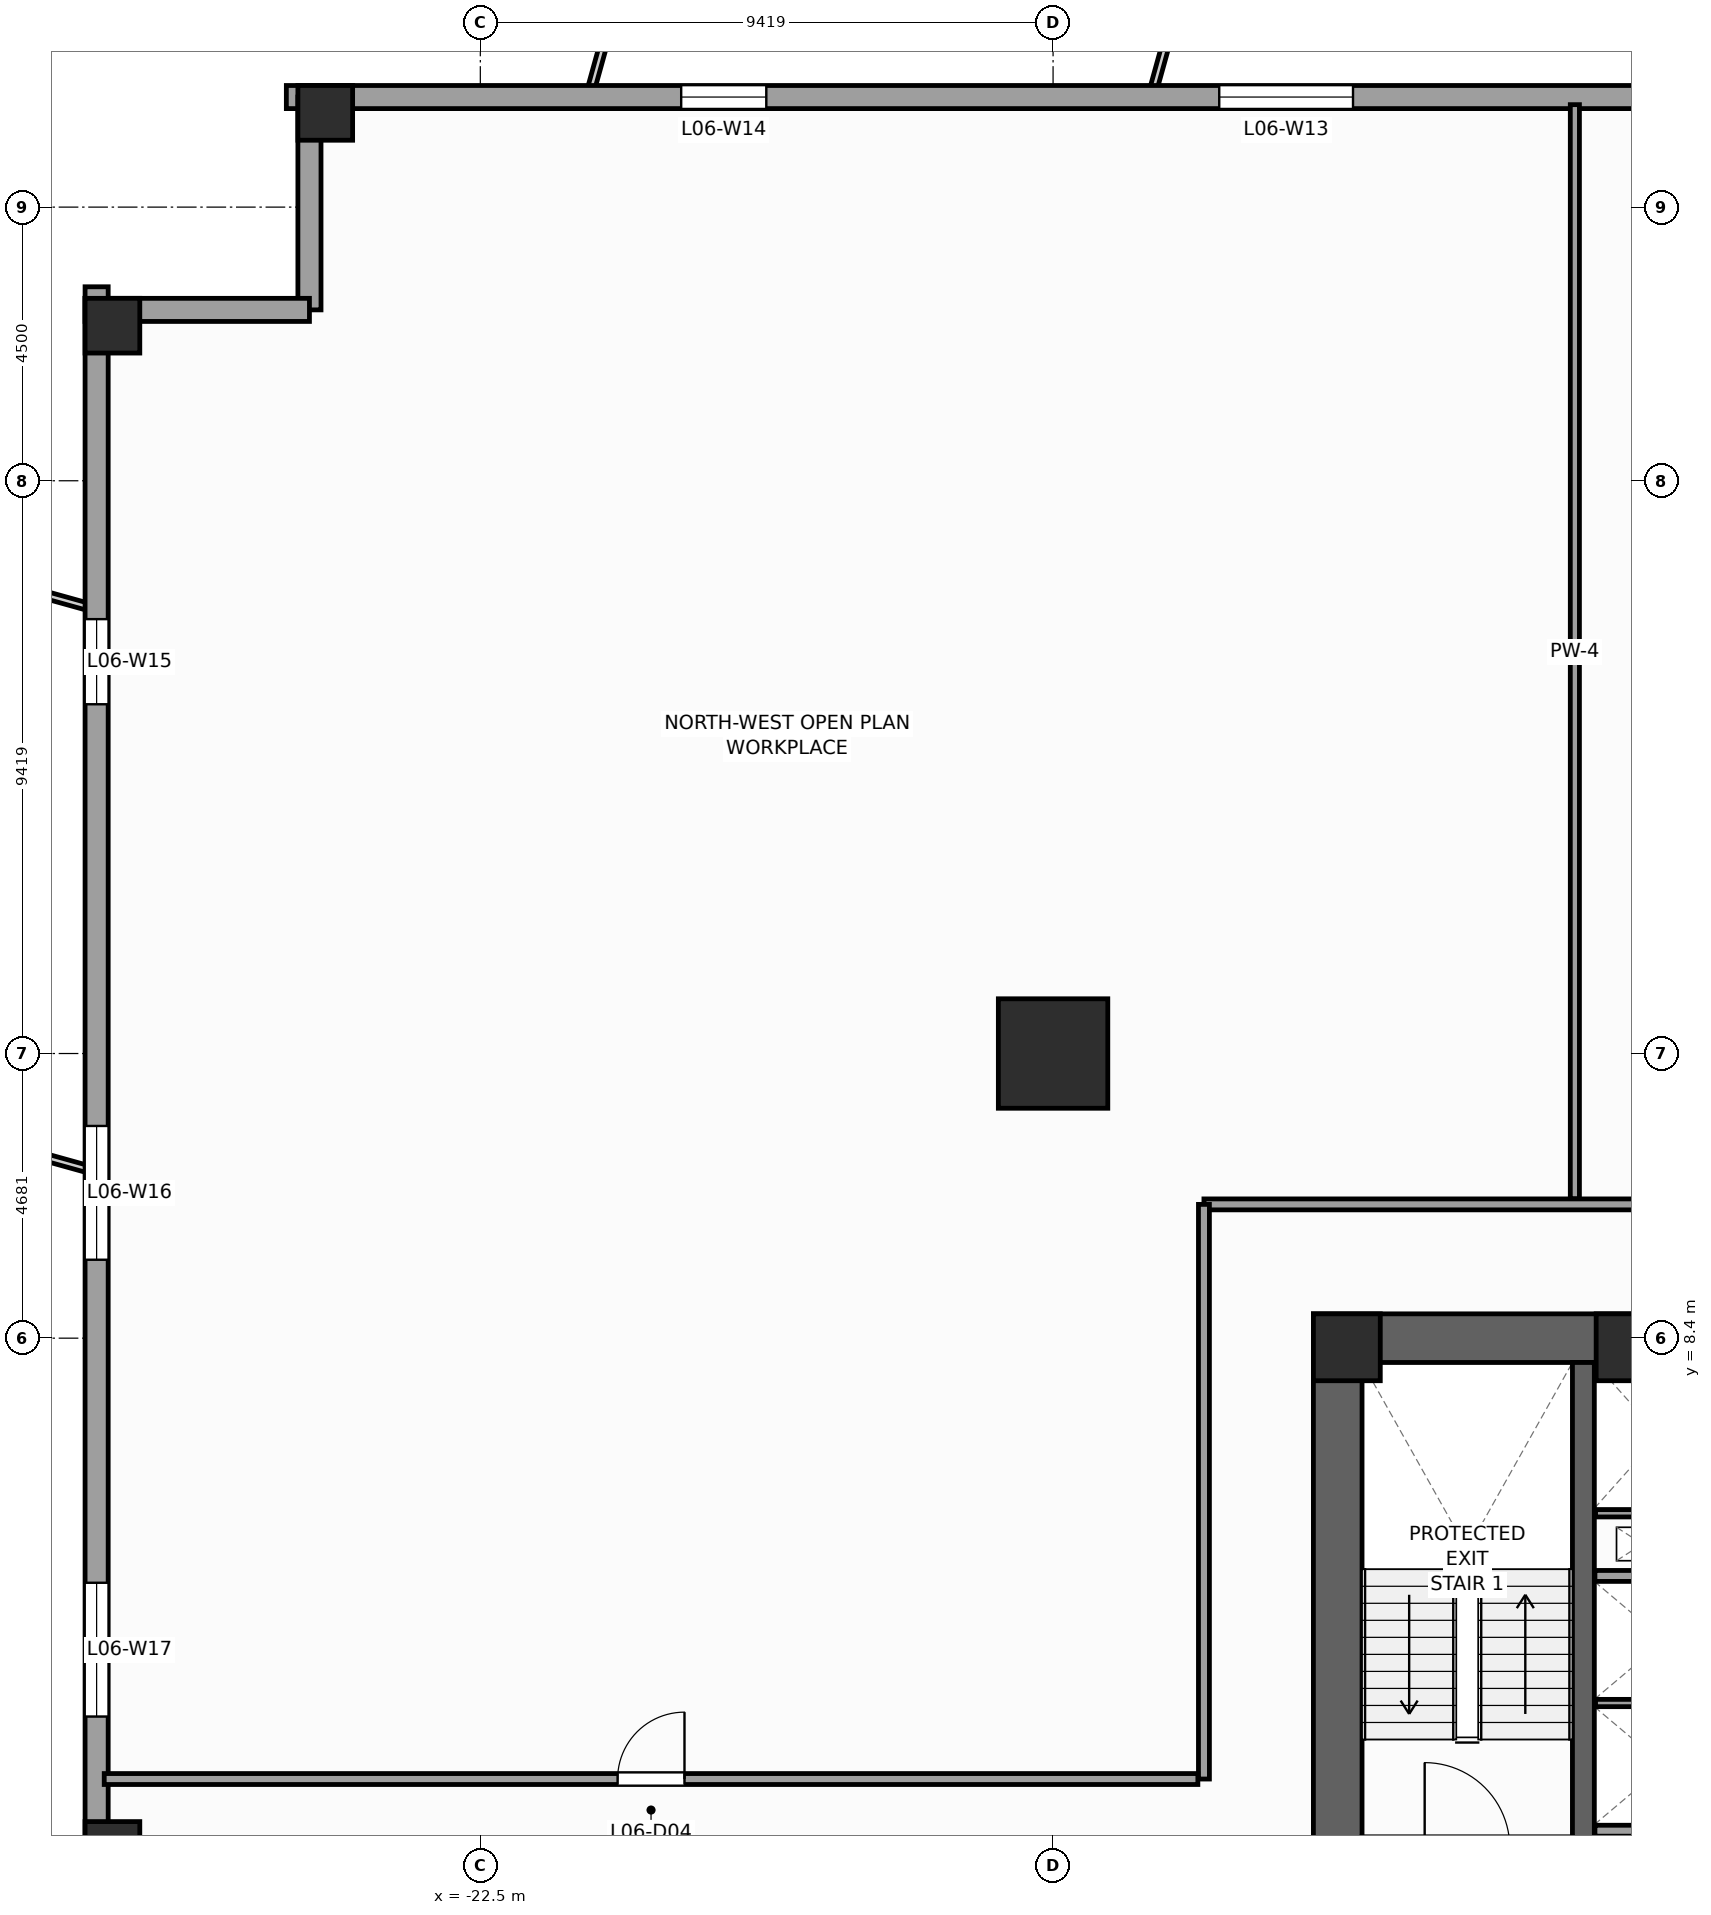
"""IFC4 building model, lengths in metres.
Left out: names, types, materials, properties, quantities, classifications, styles, units other than length and angle.
Written with IfcOpenShell. Run it as: python <this file> out.ifc"""

import sys

from ifc_helpers import new_model, si_unit, direction, frame, frame_2d, origin, origin_2d, place, context, subcontext, project, spatial, rectangle, extrude, source, transform, mapped, element, fill, save


model = new_model("IFC4")
c1 = context("Model", 3, precision=1e-05, world=origin(), true_north=direction((0.0, 1.0)))
c2 = subcontext(c1, "Body", "Model", "MODEL_VIEW")
j1 = project(units=[si_unit("LENGTHUNIT", "METRE"), si_unit("PLANEANGLEUNIT", "RADIAN")], contexts=[c1])
p1 = place(None, origin())
s1 = spatial("IfcSite", under=j1, at=p1, CompositionType="ELEMENT")
p2 = place(p1, origin())
s2 = spatial("IfcBuilding", under=s1, at=p2, CompositionType="ELEMENT")
p3 = place(p2, frame((0.0, 0.0, 30.0)))
s3 = spatial("IfcBuildingStorey", under=s2, at=p3, CompositionType="ELEMENT", Elevation=30.0)
p4 = place(p3, frame((-8.8, 8.4, 0.0), z_axis=(0.0, 0.0, 1.0), x_axis=(1.0, 0.0, 0.0)))
e1 = element("IfcWall", 1, at=p4, inside=s3, PredefinedType="SHEAR", context=c2, shape_type="SweptSolid", body=[
    extrude(rectangle(XDim=17.6, YDim=0.8, at=frame_2d((8.8, 0.0))), origin(), (0.0, 0.0, 1.0), 4.0),
])
p5 = place(p3, frame((-8.4, -8.0, 0.0), z_axis=(0.0, 0.0, 1.0), x_axis=(0.0, 1.0, 0.0)))
e2 = element("IfcWall", 2, at=p5, inside=s3, PredefinedType="SHEAR", context=c2, shape_type="SweptSolid", body=[
    extrude(rectangle(XDim=16.0, YDim=0.8, at=frame_2d((8.0, 0.0))), origin(), (0.0, 0.0, 1.0), 4.0),
])
p6 = place(p5, frame((4.69, 0.0, 0.0)))
e3 = element("IfcOpeningElement", 3, at=p6, cuts=e2, PredefinedType="OPENING", context=c2, shape_type="SweptSolid", body=[
    extrude(rectangle(XDim=1.3, YDim=2.2, at=frame_2d((0.65, 1.1))), frame((0.0, 0.41, 0.0), z_axis=(0.0, -1.0, 0.0), x_axis=(1.0, 0.0, 0.0)), (0.0, 0.0, 1.0), 0.82),
])
p7 = place(p3, frame((-4.36, -8.0, 0.0), z_axis=(0.0, 0.0, 1.0), x_axis=(0.0, 1.0, 0.0)))
e4 = element("IfcWall", 4, at=p7, inside=s3, PredefinedType="SHEAR", context=c2, shape_type="SweptSolid", body=[
    extrude(rectangle(XDim=16.0, YDim=0.36, at=frame_2d((8.0, 0.0))), origin(), (0.0, 0.0, 1.0), 4.0),
])
m1 = source(origin(), c2, "Body", "SweptSolid", [
    extrude(rectangle(XDim=1.1, YDim=1.1, at=origin_2d()), origin(), (0.0, 0.0, 1.0), 4.0),
])
for number, where, z_axis, x_axis in (
    (5, (-8.25, 8.25, 0.0), (0.0, 0.0, 1.0), (1.0, 0.0, 0.0)),
    (6, (-3.6, 8.25, 0.0), (0.0, 0.0, 1.0), (1.0, 0.0, 0.0)),
):
    element("IfcColumn", number, at=place(p3, frame(where, z_axis=z_axis, x_axis=x_axis)), inside=s3, PredefinedType="PILASTER", context=c2, shape_type="MappedRepresentation", body=[
        mapped(m1, transform((0.0, 0.0, 0.0), scale=1.0)),
    ])
m2 = source(origin(), c2, "Body", "SweptSolid", [
    extrude(rectangle(XDim=1.8, YDim=1.8, at=origin_2d()), origin(), (0.0, 0.0, 1.0), 4.0),
])
p8 = place(p3, frame((-13.081, 13.081, 0.0), z_axis=(0.0, 0.0, 1.0), x_axis=(1.0, 0.0, 0.0)))
e7 = element("IfcColumn", 7, at=p8, inside=s3, PredefinedType="COLUMN", context=c2, shape_type="MappedRepresentation", body=[
    mapped(m2, transform((0.0, 0.0, 0.0), scale=1.0)),
])
m3 = source(origin(), c2, "Body", "SweptSolid", [
    extrude(rectangle(XDim=0.9, YDim=0.9, at=origin_2d()), origin(), (0.0, 0.0, 1.0), 4.0),
])
for number, where, z_axis, x_axis in (
    (8, (-25.05, 28.55, 0.0), (0.0, 0.0, 1.0), (1.0, 0.0, 0.0)),
    (9, (-28.55, 25.05, 0.0), (0.0, 0.0, 1.0), (1.0, 0.0, 0.0)),
    (10, (-28.55, 0.0, 0.0), (0.0, 0.0, 1.0), (1.0, 0.0, 0.0)),
):
    element("IfcColumn", number, at=place(p3, frame(where, z_axis=z_axis, x_axis=x_axis)), inside=s3, PredefinedType="COLUMN", context=c2, shape_type="MappedRepresentation", body=[
        mapped(m3, transform((0.0, 0.0, 0.0), scale=1.0)),
    ])
p9 = place(p3, frame((25.69, 28.81, 0.0), z_axis=(0.0, 0.0, 1.0), x_axis=(-1.0, 0.0, 0.0)))
e11 = element("IfcWall", 11, at=p9, inside=s3, PredefinedType="STANDARD", context=c2, shape_type="SweptSolid", body=[
    extrude(rectangle(XDim=51.38, YDim=0.38, at=frame_2d((25.69, 0.0))), origin(), (0.0, 0.0, 1.0), 3.12),
])
p10 = place(p9, frame((19.565, 0.0, 0.0)))
e12 = element("IfcOpeningElement", 12, at=p10, cuts=e11, PredefinedType="OPENING", context=c2, shape_type="SweptSolid", body=[
    extrude(rectangle(XDim=1.05, YDim=2.25, at=frame_2d((0.525, 1.125))), frame((0.0, 0.2, 0.0), z_axis=(0.0, -1.0, 0.0), x_axis=(1.0, 0.0, 0.0)), (0.0, 0.0, 1.0), 0.4),
])
p11 = place(p9, frame((5.466, 0.0, 0.49)))
e13 = element("IfcOpeningElement", 13, at=p11, cuts=e11, PredefinedType="OPENING", context=c2, shape_type="SweptSolid", body=[
    extrude(rectangle(XDim=1.4, YDim=2.4, at=frame_2d((0.7, 1.2))), frame((0.0, 0.2, 0.0), z_axis=(0.0, -1.0, 0.0), x_axis=(1.0, 0.0, 0.0)), (0.0, 0.0, 1.0), 0.4),
])
p12 = place(p9, frame((13.8, 0.0, 0.49)))
e14 = element("IfcOpeningElement", 14, at=p12, cuts=e11, PredefinedType="OPENING", context=c2, shape_type="SweptSolid", body=[
    extrude(rectangle(XDim=2.2, YDim=2.4, at=frame_2d((1.1, 1.2))), frame((0.0, 0.2, 0.0), z_axis=(0.0, -1.0, 0.0), x_axis=(1.0, 0.0, 0.0)), (0.0, 0.0, 1.0), 0.4),
])
p13 = place(p9, frame((22.062, 0.0, 0.49)))
e15 = element("IfcOpeningElement", 15, at=p13, cuts=e11, PredefinedType="OPENING", context=c2, shape_type="SweptSolid", body=[
    extrude(rectangle(XDim=2.2, YDim=2.4, at=frame_2d((1.1, 1.2))), frame((0.0, 0.2, 0.0), z_axis=(0.0, -1.0, 0.0), x_axis=(1.0, 0.0, 0.0)), (0.0, 0.0, 1.0), 0.4),
])
p14 = place(p9, frame((33.838, 0.0, 0.49)))
e16 = element("IfcOpeningElement", 16, at=p14, cuts=e11, PredefinedType="OPENING", context=c2, shape_type="SweptSolid", body=[
    extrude(rectangle(XDim=2.2, YDim=2.4, at=frame_2d((1.1, 1.2))), frame((0.0, 0.2, 0.0), z_axis=(0.0, -1.0, 0.0), x_axis=(1.0, 0.0, 0.0)), (0.0, 0.0, 1.0), 0.4),
])
p15 = place(p9, frame((43.487, 0.0, 0.49)))
e17 = element("IfcOpeningElement", 17, at=p15, cuts=e11, PredefinedType="OPENING", context=c2, shape_type="SweptSolid", body=[
    extrude(rectangle(XDim=1.4, YDim=2.4, at=frame_2d((0.7, 1.2))), frame((0.0, 0.2, 0.0), z_axis=(0.0, -1.0, 0.0), x_axis=(1.0, 0.0, 0.0)), (0.0, 0.0, 1.0), 0.4),
])
p16 = place(p3, frame((-25.31, 28.81, 0.0), z_axis=(0.0, 0.0, 1.0), x_axis=(0.0, -1.0, 0.0)))
e18 = element("IfcWall", 18, at=p16, inside=s3, PredefinedType="STANDARD", context=c2, shape_type="SweptSolid", body=[
    extrude(rectangle(XDim=3.5, YDim=0.38, at=frame_2d((1.75, 0.0))), origin(), (0.0, 0.0, 1.0), 3.72),
])
p17 = place(p3, frame((-25.31, 25.31, 0.0), z_axis=(0.0, 0.0, 1.0), x_axis=(-1.0, 0.0, 0.0)))
e19 = element("IfcWall", 19, at=p17, inside=s3, PredefinedType="STANDARD", context=c2, shape_type="SweptSolid", body=[
    extrude(rectangle(XDim=3.69, YDim=0.38, at=frame_2d((1.845, 0.0))), origin(), (0.0, 0.0, 1.0), 3.72),
])
p18 = place(p3, frame((-28.81, 25.69, 0.0), z_axis=(0.0, 0.0, 1.0), x_axis=(0.0, -1.0, 0.0)))
e20 = element("IfcWall", 20, at=p18, inside=s3, PredefinedType="STANDARD", context=c2, shape_type="SweptSolid", body=[
    extrude(rectangle(XDim=51.38, YDim=0.38, at=frame_2d((25.69, 0.0))), origin(), (0.0, 0.0, 1.0), 3.12),
])
p19 = place(p18, frame((5.466, 0.0, 0.49)))
e21 = element("IfcOpeningElement", 21, at=p19, cuts=e20, PredefinedType="OPENING", context=c2, shape_type="SweptSolid", body=[
    extrude(rectangle(XDim=1.4, YDim=2.4, at=frame_2d((0.7, 1.2))), frame((0.0, 0.2, 0.0), z_axis=(0.0, -1.0, 0.0), x_axis=(1.0, 0.0, 0.0)), (0.0, 0.0, 1.0), 0.4),
])
p20 = place(p18, frame((13.8, 0.0, 0.49)))
e22 = element("IfcOpeningElement", 22, at=p20, cuts=e20, PredefinedType="OPENING", context=c2, shape_type="SweptSolid", body=[
    extrude(rectangle(XDim=2.2, YDim=2.4, at=frame_2d((1.1, 1.2))), frame((0.0, 0.2, 0.0), z_axis=(0.0, -1.0, 0.0), x_axis=(1.0, 0.0, 0.0)), (0.0, 0.0, 1.0), 0.4),
])
p21 = place(p18, frame((21.312, 0.0, 0.49)))
e23 = element("IfcOpeningElement", 23, at=p21, cuts=e20, PredefinedType="OPENING", context=c2, shape_type="SweptSolid", body=[
    extrude(rectangle(XDim=2.2, YDim=2.4, at=frame_2d((1.1, 1.2))), frame((0.0, 0.2, 0.0), z_axis=(0.0, -1.0, 0.0), x_axis=(1.0, 0.0, 0.0)), (0.0, 0.0, 1.0), 0.4),
])
p22 = place(p18, frame((33.838, 0.0, 0.49)))
e24 = element("IfcOpeningElement", 24, at=p22, cuts=e20, PredefinedType="OPENING", context=c2, shape_type="SweptSolid", body=[
    extrude(rectangle(XDim=2.2, YDim=2.4, at=frame_2d((1.1, 1.2))), frame((0.0, 0.2, 0.0), z_axis=(0.0, -1.0, 0.0), x_axis=(1.0, 0.0, 0.0)), (0.0, 0.0, 1.0), 0.4),
])
p23 = place(p18, frame((43.487, 0.0, 0.49)))
e25 = element("IfcOpeningElement", 25, at=p23, cuts=e20, PredefinedType="OPENING", context=c2, shape_type="SweptSolid", body=[
    extrude(rectangle(XDim=1.4, YDim=2.4, at=frame_2d((0.7, 1.2))), frame((0.0, 0.2, 0.0), z_axis=(0.0, -1.0, 0.0), x_axis=(1.0, 0.0, 0.0)), (0.0, 0.0, 1.0), 0.4),
])
for number, where, z_axis, x_axis in (
    (26, (-4.17, 0.3, 0.0), (0.0, 0.0, 1.0), (1.0, 0.0, 0.0)),
    (27, (-4.17, 4.49, 0.0), (0.0, 0.0, 1.0), (1.0, 0.0, 0.0)),
):
    element("IfcWall", number, at=place(p3, frame(where, z_axis=z_axis, x_axis=x_axis)), inside=s3, PredefinedType="PARTITIONING", context=c2, shape_type="SweptSolid", body=[
        extrude(rectangle(XDim=2.28, YDim=0.18, at=frame_2d((1.14, 0.0))), origin(), (0.0, 0.0, 1.0), 3.72),
    ])
p24 = place(p3, frame((-4.16, 2.4, 0.0), z_axis=(0.0, 0.0, 1.0), x_axis=(1.0, 0.0, 0.0)))
e28 = element("IfcWall", 28, at=p24, inside=s3, PredefinedType="PARTITIONING", context=c2, shape_type="SweptSolid", body=[
    extrude(rectangle(XDim=2.26, YDim=0.12, at=frame_2d((1.13, 0.0))), origin(), (0.0, 0.0, 1.0), 3.72),
])
p25 = place(p3, frame((-4.16, 5.52, 0.0), z_axis=(0.0, 0.0, 1.0), x_axis=(1.0, 0.0, 0.0)))
e29 = element("IfcWall", 29, at=p25, inside=s3, PredefinedType="PARTITIONING", context=c2, shape_type="SweptSolid", body=[
    extrude(rectangle(XDim=2.1, YDim=0.12, at=frame_2d((1.05, 0.0))), origin(), (0.0, 0.0, 1.0), 3.72),
])
p26 = place(p3, frame((-10.6, 10.6, 0.0), z_axis=(0.0, 0.0, 1.0), x_axis=(1.0, 0.0, 0.0)))
e30 = element("IfcWall", 30, at=p26, inside=s3, PredefinedType="PARTITIONING", context=c2, shape_type="SweptSolid", body=[
    extrude(rectangle(XDim=21.2, YDim=0.18, at=frame_2d((10.6, 0.0))), origin(), (0.0, 0.0, 1.0), 3.72),
])
p27 = place(p26, frame((10.05, 0.0, 0.0)))
e31 = element("IfcOpeningElement", 31, at=p27, cuts=e30, PredefinedType="OPENING", context=c2, shape_type="SweptSolid", body=[
    extrude(rectangle(XDim=1.1, YDim=2.2, at=frame_2d((0.55, 1.1))), frame((0.0, 0.1, 0.0), z_axis=(0.0, -1.0, 0.0), x_axis=(1.0, 0.0, 0.0)), (0.0, 0.0, 1.0), 0.2),
])
p28 = place(p3, frame((-10.6, 1.15, 0.0), z_axis=(0.0, 0.0, 1.0), x_axis=(0.0, 1.0, 0.0)))
e32 = element("IfcWall", 32, at=p28, inside=s3, PredefinedType="PARTITIONING", context=c2, shape_type="SweptSolid", body=[
    extrude(rectangle(XDim=9.45, YDim=0.18, at=frame_2d((4.725, 0.0))), origin(), (0.0, 0.0, 1.0), 3.72),
])
p29 = place(p3, frame((-28.685, 1.15, 0.0), z_axis=(0.0, 0.0, 1.0), x_axis=(1.0, 0.0, 0.0)))
e33 = element("IfcWall", 33, at=p29, inside=s3, PredefinedType="PARTITIONING", context=c2, shape_type="SweptSolid", body=[
    extrude(rectangle(XDim=17.985, YDim=0.18, at=frame_2d((8.993, 0.0))), origin(), (0.0, 0.0, 1.0), 3.72),
])
p30 = place(p29, frame((8.442, 0.0, 0.0)))
e34 = element("IfcOpeningElement", 34, at=p30, cuts=e33, PredefinedType="OPENING", context=c2, shape_type="SweptSolid", body=[
    extrude(rectangle(XDim=1.1, YDim=2.2, at=frame_2d((0.55, 1.1))), frame((0.0, 0.1, 0.0), z_axis=(0.0, -1.0, 0.0), x_axis=(1.0, 0.0, 0.0)), (0.0, 0.0, 1.0), 0.2),
])
p31 = place(p3, frame((-4.5, 10.695, 0.0), z_axis=(0.0, 0.0, 1.0), x_axis=(0.0, 1.0, 0.0)))
e35 = element("IfcWall", 35, at=p31, inside=s3, PredefinedType="PARTITIONING", context=c2, shape_type="SweptSolid", body=[
    extrude(rectangle(XDim=17.99, YDim=0.15, at=frame_2d((8.995, 0.0))), origin(), (0.0, 0.0, 1.0), 3.72),
])
m4 = source(origin(), c2, "Body", "SweptSolid", [
    extrude(rectangle(XDim=2.2, YDim=2.4, at=frame_2d((1.1, 1.2))), frame((0.0, 0.03, 0.0), z_axis=(0.0, -1.0, 0.0), x_axis=(1.0, 0.0, 0.0)), (0.0, 0.0, 1.0), 0.06),
])
p32 = place(p14, origin())
e36 = element("IfcWindow", 36, at=p32, inside=s3, PartitioningType="SINGLE_PANEL", PredefinedType="WINDOW", context=c2, shape_type="MappedRepresentation", body=[
    mapped(m4, transform((0.0, 0.0, 0.0), scale=1.0)),
])
fill(e16, e36)
m5 = source(origin(), c2, "Body", "SweptSolid", [
    extrude(rectangle(XDim=1.4, YDim=2.4, at=frame_2d((0.7, 1.2))), frame((0.0, 0.03, 0.0), z_axis=(0.0, -1.0, 0.0), x_axis=(1.0, 0.0, 0.0)), (0.0, 0.0, 1.0), 0.06),
])
p33 = place(p15, origin())
e37 = element("IfcWindow", 37, at=p33, inside=s3, PartitioningType="SINGLE_PANEL", PredefinedType="WINDOW", context=c2, shape_type="MappedRepresentation", body=[
    mapped(m5, transform((0.0, 0.0, 0.0), scale=1.0)),
])
fill(e17, e37)
p34 = place(p19, origin())
e38 = element("IfcWindow", 38, at=p34, inside=s3, PartitioningType="SINGLE_PANEL", PredefinedType="WINDOW", context=c2, shape_type="MappedRepresentation", body=[
    mapped(m5, transform((0.0, 0.0, 0.0), scale=1.0)),
])
fill(e21, e38)
p35 = place(p20, origin())
e39 = element("IfcWindow", 39, at=p35, inside=s3, PartitioningType="SINGLE_PANEL", PredefinedType="WINDOW", context=c2, shape_type="MappedRepresentation", body=[
    mapped(m4, transform((0.0, 0.0, 0.0), scale=1.0)),
])
fill(e22, e39)
p36 = place(p21, origin())
e40 = element("IfcWindow", 40, at=p36, inside=s3, PartitioningType="SINGLE_PANEL", PredefinedType="WINDOW", context=c2, shape_type="MappedRepresentation", body=[
    mapped(m4, transform((0.0, 0.0, 0.0), scale=1.0)),
])
fill(e23, e40)
m6 = source(origin(), c2, "Body", "SweptSolid", [
    extrude(rectangle(XDim=1.1, YDim=2.2, at=frame_2d((0.55, 1.1))), frame((0.0, 0.025, 0.0), z_axis=(0.0, -1.0, 0.0), x_axis=(1.0, 0.0, 0.0)), (0.0, 0.0, 1.0), 0.05),
])
p37 = place(p30, origin())
e41 = element("IfcDoor", 41, at=p37, inside=s3, OperationType="SINGLE_SWING_RIGHT", PredefinedType="DOOR", context=c2, shape_type="MappedRepresentation", body=[
    mapped(m6, transform((0.0, 0.0, 0.0), scale=1.0)),
])
fill(e34, e41)
save(model, sys.argv[1])
